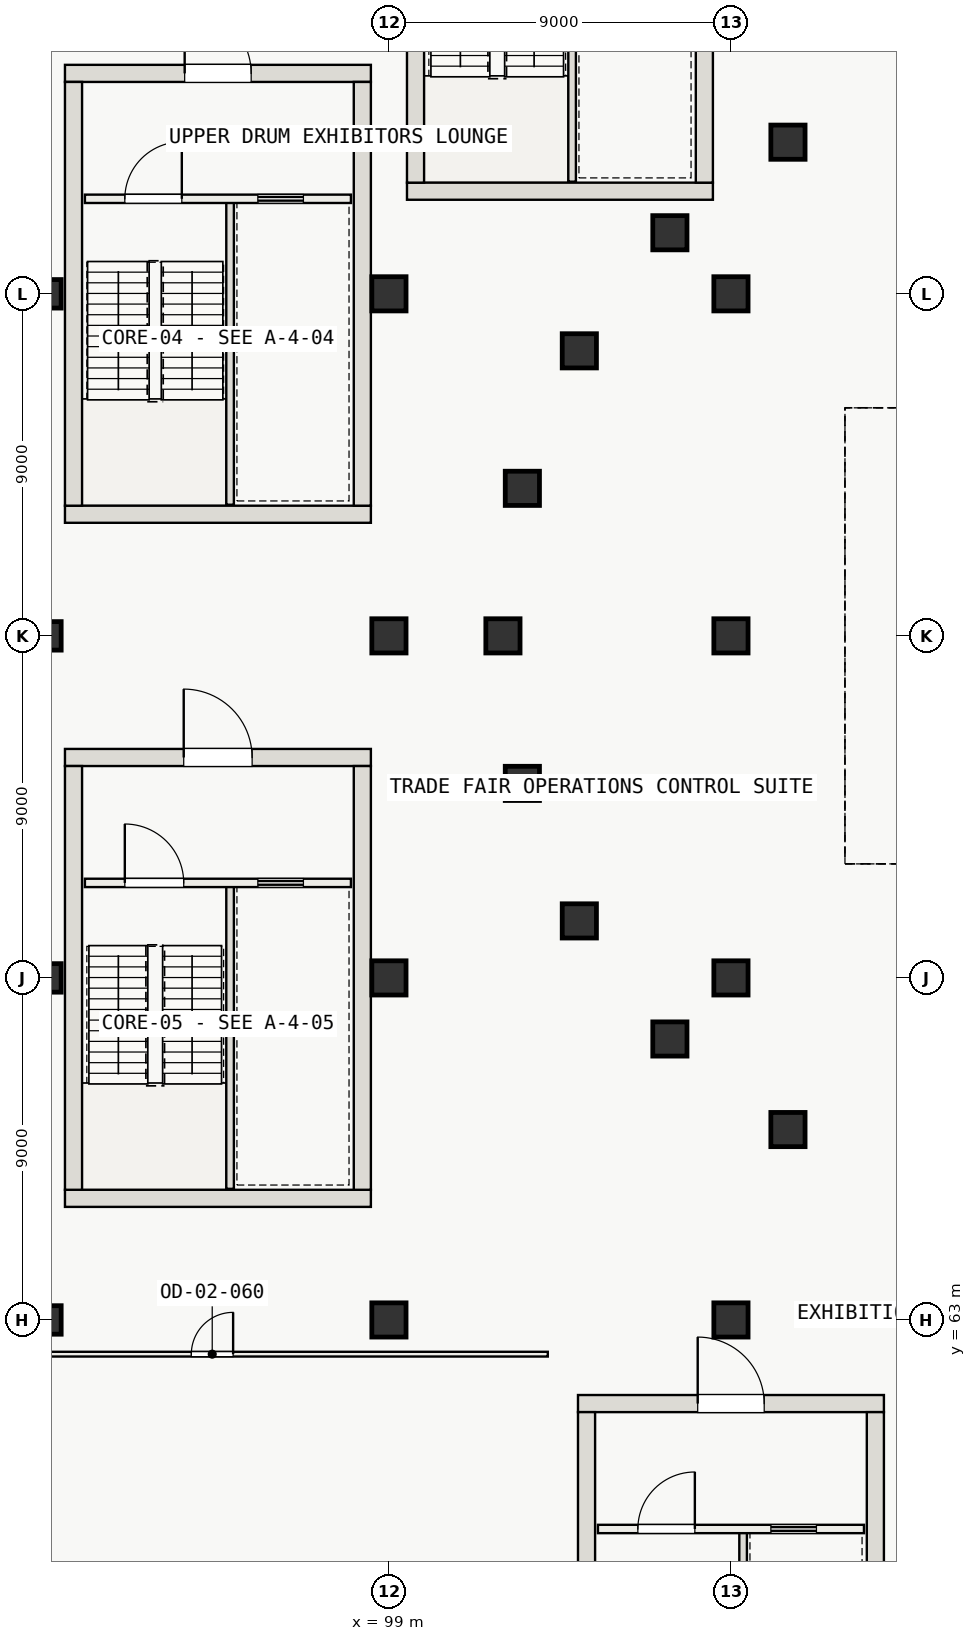
"""IFC4 building model, lengths in metres.
Left out: names, types, materials, properties, quantities, classifications, styles, units other than length and angle.
Written with IfcOpenShell. Run it as: python <this file> out.ifc"""

import sys

from ifc_helpers import new_model, si_unit, direction, frame, frame_2d, origin, origin_2d, place, context, subcontext, project, spatial, rectangle, circle, extrude, element, fill, save


model = new_model("IFC4")
c1 = context("Model", 3, precision=1e-05, world=origin(), true_north=direction((0.0, 1.0)))
c2 = subcontext(c1, "Body", "Model", "MODEL_VIEW")
j1 = project(units=[si_unit("LENGTHUNIT", "METRE"), si_unit("PLANEANGLEUNIT", "RADIAN")], contexts=[c1])
p1 = place(None, origin())
s1 = spatial("IfcSite", under=j1, at=p1, CompositionType="ELEMENT")
p2 = place(p1, origin())
s2 = spatial("IfcBuilding", under=s1, at=p2, CompositionType="ELEMENT")
p3 = place(p2, frame((0.0, 0.0, 16.8)))
s3 = spatial("IfcBuildingStorey", under=s2, at=p3, CompositionType="ELEMENT", Elevation=16.8)
p4 = place(p3, frame((99.475, 92.7, 0.0), z_axis=(0.0, 0.0, 1.0), x_axis=(1.0, 0.0, 0.0)))
e1 = element("IfcWall", 1, at=p4, inside=s3, PredefinedType="SHEAR", context=c2, shape_type="SweptSolid", body=[
    extrude(rectangle(XDim=8.05, YDim=0.45, at=frame_2d((4.025, 0.0))), origin(), (0.0, 0.0, 1.0), 4.8),
])
for number, where, z_axis, x_axis in (
    (2, (99.7, 92.925, 0.0), (0.0, 0.0, 1.0), (0.0, 1.0, 0.0)),
    (3, (107.3, 92.925, 0.0), (0.0, 0.0, 1.0), (0.0, 1.0, 0.0)),
):
    element("IfcWall", number, at=place(p3, frame(where, z_axis=z_axis, x_axis=x_axis)), inside=s3, PredefinedType="SHEAR", context=c2, shape_type="SweptSolid", body=[
        extrude(rectangle(XDim=11.15, YDim=0.45, at=frame_2d((5.575, 0.0))), origin(), (0.0, 0.0, 1.0), 4.8),
    ])
p5 = place(p3, frame((90.475, 84.2, 0.0), z_axis=(0.0, 0.0, 1.0), x_axis=(1.0, 0.0, 0.0)))
e4 = element("IfcWall", 4, at=p5, inside=s3, PredefinedType="SHEAR", context=c2, shape_type="SweptSolid", body=[
    extrude(rectangle(XDim=8.05, YDim=0.45, at=frame_2d((4.025, 0.0))), origin(), (0.0, 0.0, 1.0), 4.8),
])
p6 = place(p3, frame((90.475, 95.8, 0.0), z_axis=(0.0, 0.0, 1.0), x_axis=(1.0, 0.0, 0.0)))
e5 = element("IfcWall", 5, at=p6, inside=s3, PredefinedType="SHEAR", context=c2, shape_type="SweptSolid", body=[
    extrude(rectangle(XDim=8.05, YDim=0.45, at=frame_2d((4.025, 0.0))), origin(), (0.0, 0.0, 1.0), 4.8),
])
p7 = place(p6, frame((3.15, 0.0, 0.0)))
e6 = element("IfcOpeningElement", 6, at=p7, cuts=e5, PredefinedType="OPENING", context=c2, shape_type="SweptSolid", body=[
    extrude(rectangle(XDim=1.75, YDim=2.3, at=frame_2d((0.875, 1.15))), frame((0.0, 0.235, 0.0), z_axis=(0.0, -1.0, 0.0), x_axis=(1.0, 0.0, 0.0)), (0.0, 0.0, 1.0), 0.47),
])
for number, where, z_axis, x_axis in (
    (7, (90.7, 84.425, 0.0), (0.0, 0.0, 1.0), (0.0, 1.0, 0.0)),
    (8, (98.3, 84.425, 0.0), (0.0, 0.0, 1.0), (0.0, 1.0, 0.0)),
):
    element("IfcWall", number, at=place(p3, frame(where, z_axis=z_axis, x_axis=x_axis)), inside=s3, PredefinedType="SHEAR", context=c2, shape_type="SweptSolid", body=[
        extrude(rectangle(XDim=11.15, YDim=0.45, at=frame_2d((5.575, 0.0))), origin(), (0.0, 0.0, 1.0), 4.8),
    ])
p8 = place(p3, frame((90.475, 66.2, 0.0), z_axis=(0.0, 0.0, 1.0), x_axis=(1.0, 0.0, 0.0)))
e9 = element("IfcWall", 9, at=p8, inside=s3, PredefinedType="SHEAR", context=c2, shape_type="SweptSolid", body=[
    extrude(rectangle(XDim=8.05, YDim=0.45, at=frame_2d((4.025, 0.0))), origin(), (0.0, 0.0, 1.0), 4.8),
])
p9 = place(p3, frame((90.475, 77.8, 0.0), z_axis=(0.0, 0.0, 1.0), x_axis=(1.0, 0.0, 0.0)))
e10 = element("IfcWall", 10, at=p9, inside=s3, PredefinedType="SHEAR", context=c2, shape_type="SweptSolid", body=[
    extrude(rectangle(XDim=8.05, YDim=0.45, at=frame_2d((4.025, 0.0))), origin(), (0.0, 0.0, 1.0), 4.8),
])
p10 = place(p9, frame((3.125, 0.0, 0.0)))
e11 = element("IfcOpeningElement", 11, at=p10, cuts=e10, PredefinedType="OPENING", context=c2, shape_type="SweptSolid", body=[
    extrude(rectangle(XDim=1.8, YDim=2.3, at=frame_2d((0.9, 1.15))), frame((0.0, 0.235, 0.0), z_axis=(0.0, -1.0, 0.0), x_axis=(1.0, 0.0, 0.0)), (0.0, 0.0, 1.0), 0.47),
])
for number, where, z_axis, x_axis in (
    (12, (90.7, 66.425, 0.0), (0.0, 0.0, 1.0), (0.0, 1.0, 0.0)),
    (13, (98.3, 66.425, 0.0), (0.0, 0.0, 1.0), (0.0, 1.0, 0.0)),
):
    element("IfcWall", number, at=place(p3, frame(where, z_axis=z_axis, x_axis=x_axis)), inside=s3, PredefinedType="SHEAR", context=c2, shape_type="SweptSolid", body=[
        extrude(rectangle(XDim=11.15, YDim=0.45, at=frame_2d((5.575, 0.0))), origin(), (0.0, 0.0, 1.0), 4.8),
    ])
p11 = place(p3, frame((103.975, 60.8, 0.0), z_axis=(0.0, 0.0, 1.0), x_axis=(1.0, 0.0, 0.0)))
e14 = element("IfcWall", 14, at=p11, inside=s3, PredefinedType="SHEAR", context=c2, shape_type="SweptSolid", body=[
    extrude(rectangle(XDim=8.05, YDim=0.45, at=frame_2d((4.025, 0.0))), origin(), (0.0, 0.0, 1.0), 4.8),
])
p12 = place(p11, frame((3.15, 0.0, 0.0)))
e15 = element("IfcOpeningElement", 15, at=p12, cuts=e14, PredefinedType="OPENING", context=c2, shape_type="SweptSolid", body=[
    extrude(rectangle(XDim=1.75, YDim=2.3, at=frame_2d((0.875, 1.15))), frame((0.0, 0.235, 0.0), z_axis=(0.0, -1.0, 0.0), x_axis=(1.0, 0.0, 0.0)), (0.0, 0.0, 1.0), 0.47),
])
for number, where, z_axis, x_axis in (
    (16, (104.2, 49.425, 0.0), (0.0, 0.0, 1.0), (0.0, 1.0, 0.0)),
    (17, (111.8, 49.425, 0.0), (0.0, 0.0, 1.0), (0.0, 1.0, 0.0)),
):
    element("IfcWall", number, at=place(p3, frame(where, z_axis=z_axis, x_axis=x_axis)), inside=s3, PredefinedType="SHEAR", context=c2, shape_type="SweptSolid", body=[
        extrude(rectangle(XDim=11.15, YDim=0.45, at=frame_2d((5.575, 0.0))), origin(), (0.0, 0.0, 1.0), 4.8),
    ])
for number, where, z_axis, x_axis in (
    (18, (90.0, 63.0, 0.0), (0.0, 0.0, 1.0), (1.0, 0.0, 0.0)),
    (19, (90.0, 72.0, 0.0), (0.0, 0.0, 1.0), (1.0, 0.0, 0.0)),
    (20, (90.0, 81.0, 0.0), (0.0, 0.0, 1.0), (1.0, 0.0, 0.0)),
    (21, (90.0, 90.0, 0.0), (0.0, 0.0, 1.0), (1.0, 0.0, 0.0)),
):
    element("IfcColumn", number, at=place(p3, frame(where, z_axis=z_axis, x_axis=x_axis)), inside=s3, PredefinedType="COLUMN", context=c2, shape_type="SweptSolid", body=[
        extrude(rectangle(XDim=0.75, YDim=0.75, at=origin_2d()), origin(), (0.0, 0.0, 1.0), 4.8),
    ])
for number, where, z_axis, x_axis in (
    (22, (99.0, 63.0, 0.0), (0.0, 0.0, 1.0), (1.0, 0.0, 0.0)),
    (23, (99.0, 72.0, 0.0), (0.0, 0.0, 1.0), (1.0, 0.0, 0.0)),
    (24, (99.0, 81.0, 0.0), (0.0, 0.0, 1.0), (1.0, 0.0, 0.0)),
    (25, (99.0, 90.0, 0.0), (0.0, 0.0, 1.0), (1.0, 0.0, 0.0)),
):
    element("IfcColumn", number, at=place(p3, frame(where, z_axis=z_axis, x_axis=x_axis)), inside=s3, PredefinedType="COLUMN", context=c2, shape_type="SweptSolid", body=[
        extrude(rectangle(XDim=0.9, YDim=0.9, at=origin_2d()), origin(), (0.0, 0.0, 1.0), 4.8),
    ])
for number, where, z_axis, x_axis in (
    (26, (102.0, 81.0, 0.0), (0.0, 0.0, 1.0), (1.0, 0.0, 0.0)),
    (27, (102.511, 77.118, 0.0), (0.0, 0.0, 1.0), (1.0, 0.0, 0.0)),
    (28, (102.511, 84.882, 0.0), (0.0, 0.0, 1.0), (1.0, 0.0, 0.0)),
    (29, (104.01, 73.5, 0.0), (0.0, 0.0, 1.0), (1.0, 0.0, 0.0)),
    (30, (104.01, 88.5, 0.0), (0.0, 0.0, 1.0), (1.0, 0.0, 0.0)),
    (31, (106.393, 70.393, 0.0), (0.0, 0.0, 1.0), (1.0, 0.0, 0.0)),
    (32, (106.393, 91.607, 0.0), (0.0, 0.0, 1.0), (1.0, 0.0, 0.0)),
):
    element("IfcColumn", number, at=place(p3, frame(where, z_axis=z_axis, x_axis=x_axis)), inside=s3, PredefinedType="COLUMN", context=c2, shape_type="SweptSolid", body=[
        extrude(circle(Radius=0.45, at=origin_2d()), origin(), (0.0, 0.0, 1.0), 4.45),
    ])
for number, where, z_axis, x_axis in (
    (33, (108.0, 63.0, 0.0), (0.0, 0.0, 1.0), (1.0, 0.0, 0.0)),
    (34, (108.0, 72.0, 0.0), (0.0, 0.0, 1.0), (1.0, 0.0, 0.0)),
    (35, (108.0, 81.0, 0.0), (0.0, 0.0, 1.0), (1.0, 0.0, 0.0)),
    (36, (108.0, 90.0, 0.0), (0.0, 0.0, 1.0), (1.0, 0.0, 0.0)),
):
    element("IfcColumn", number, at=place(p3, frame(where, z_axis=z_axis, x_axis=x_axis)), inside=s3, PredefinedType="COLUMN", context=c2, shape_type="SweptSolid", body=[
        extrude(rectangle(XDim=0.9, YDim=0.9, at=origin_2d()), origin(), (0.0, 0.0, 1.0), 4.8),
    ])
for number, where, z_axis, x_axis in (
    (37, (109.5, 68.01, 0.0), (0.0, 0.0, 1.0), (1.0, 0.0, 0.0)),
    (38, (109.5, 93.99, 0.0), (0.0, 0.0, 1.0), (1.0, 0.0, 0.0)),
):
    element("IfcColumn", number, at=place(p3, frame(where, z_axis=z_axis, x_axis=x_axis)), inside=s3, PredefinedType="COLUMN", context=c2, shape_type="SweptSolid", body=[
        extrude(circle(Radius=0.45, at=origin_2d()), origin(), (0.0, 0.0, 1.0), 4.45),
    ])
for number, where, z_axis, x_axis in (
    (39, (103.82, 92.95, 0.0), (0.0, 0.0, 1.0), (0.0, 1.0, 0.0)),
    (40, (94.82, 84.45, 0.0), (0.0, 0.0, 1.0), (0.0, 1.0, 0.0)),
):
    element("IfcWall", number, at=place(p3, frame(where, z_axis=z_axis, x_axis=x_axis)), inside=s3, PredefinedType="SOLIDWALL", context=c2, shape_type="SweptSolid", body=[
        extrude(rectangle(XDim=8.0, YDim=0.2, at=frame_2d((4.0, 0.0))), origin(), (0.0, 0.0, 1.0), 4.8),
    ])
p13 = place(p3, frame((91.0, 92.5, 0.0), z_axis=(0.0, 0.0, 1.0), x_axis=(1.0, 0.0, 0.0)))
e41 = element("IfcWall", 41, at=p13, inside=s3, PredefinedType="SOLIDWALL", context=c2, shape_type="SweptSolid", body=[
    extrude(rectangle(XDim=7.0, YDim=0.22, at=frame_2d((3.5, 0.0))), origin(), (0.0, 0.0, 1.0), 4.49),
])
p14 = place(p13, frame((1.05, 0.0, 0.0)))
e42 = element("IfcOpeningElement", 42, at=p14, cuts=e41, PredefinedType="OPENING", context=c2, shape_type="SweptSolid", body=[
    extrude(rectangle(XDim=1.5, YDim=2.2, at=frame_2d((0.75, 1.1))), frame((0.0, 0.12, 0.0), z_axis=(0.0, -1.0, 0.0), x_axis=(1.0, 0.0, 0.0)), (0.0, 0.0, 1.0), 0.24),
])
p15 = place(p13, frame((4.55, 0.0, 0.0)))
e43 = element("IfcOpeningElement", 43, at=p15, cuts=e41, PredefinedType="OPENING", context=c2, shape_type="SweptSolid", body=[
    extrude(rectangle(XDim=1.2, YDim=2.2, at=frame_2d((0.6, 1.1))), frame((0.0, 0.12, 0.0), z_axis=(0.0, -1.0, 0.0), x_axis=(1.0, 0.0, 0.0)), (0.0, 0.0, 1.0), 0.24),
])
p16 = place(p3, frame((94.82, 66.45, 0.0), z_axis=(0.0, 0.0, 1.0), x_axis=(0.0, 1.0, 0.0)))
e44 = element("IfcWall", 44, at=p16, inside=s3, PredefinedType="SOLIDWALL", context=c2, shape_type="SweptSolid", body=[
    extrude(rectangle(XDim=8.0, YDim=0.2, at=frame_2d((4.0, 0.0))), origin(), (0.0, 0.0, 1.0), 4.8),
])
p17 = place(p3, frame((91.0, 74.5, 0.0), z_axis=(0.0, 0.0, 1.0), x_axis=(1.0, 0.0, 0.0)))
e45 = element("IfcWall", 45, at=p17, inside=s3, PredefinedType="SOLIDWALL", context=c2, shape_type="SweptSolid", body=[
    extrude(rectangle(XDim=7.0, YDim=0.22, at=frame_2d((3.5, 0.0))), origin(), (0.0, 0.0, 1.0), 4.49),
])
p18 = place(p17, frame((1.05, 0.0, 0.0)))
e46 = element("IfcOpeningElement", 46, at=p18, cuts=e45, PredefinedType="OPENING", context=c2, shape_type="SweptSolid", body=[
    extrude(rectangle(XDim=1.55, YDim=2.2, at=frame_2d((0.775, 1.1))), frame((0.0, 0.12, 0.0), z_axis=(0.0, -1.0, 0.0), x_axis=(1.0, 0.0, 0.0)), (0.0, 0.0, 1.0), 0.24),
])
p19 = place(p17, frame((4.55, 0.0, 0.0)))
e47 = element("IfcOpeningElement", 47, at=p19, cuts=e45, PredefinedType="OPENING", context=c2, shape_type="SweptSolid", body=[
    extrude(rectangle(XDim=1.2, YDim=2.2, at=frame_2d((0.6, 1.1))), frame((0.0, 0.12, 0.0), z_axis=(0.0, -1.0, 0.0), x_axis=(1.0, 0.0, 0.0)), (0.0, 0.0, 1.0), 0.24),
])
p20 = place(p3, frame((108.32, 49.45, 0.0), z_axis=(0.0, 0.0, 1.0), x_axis=(0.0, 1.0, 0.0)))
e48 = element("IfcWall", 48, at=p20, inside=s3, PredefinedType="SOLIDWALL", context=c2, shape_type="SweptSolid", body=[
    extrude(rectangle(XDim=8.0, YDim=0.2, at=frame_2d((4.0, 0.0))), origin(), (0.0, 0.0, 1.0), 4.8),
])
p21 = place(p3, frame((104.5, 57.5, 0.0), z_axis=(0.0, 0.0, 1.0), x_axis=(1.0, 0.0, 0.0)))
e49 = element("IfcWall", 49, at=p21, inside=s3, PredefinedType="SOLIDWALL", context=c2, shape_type="SweptSolid", body=[
    extrude(rectangle(XDim=7.0, YDim=0.22, at=frame_2d((3.5, 0.0))), origin(), (0.0, 0.0, 1.0), 4.49),
])
p22 = place(p21, frame((1.05, 0.0, 0.0)))
e50 = element("IfcOpeningElement", 50, at=p22, cuts=e49, PredefinedType="OPENING", context=c2, shape_type="SweptSolid", body=[
    extrude(rectangle(XDim=1.5, YDim=2.2, at=frame_2d((0.75, 1.1))), frame((0.0, 0.12, 0.0), z_axis=(0.0, -1.0, 0.0), x_axis=(1.0, 0.0, 0.0)), (0.0, 0.0, 1.0), 0.24),
])
p23 = place(p21, frame((4.55, 0.0, 0.0)))
e51 = element("IfcOpeningElement", 51, at=p23, cuts=e49, PredefinedType="OPENING", context=c2, shape_type="SweptSolid", body=[
    extrude(rectangle(XDim=1.2, YDim=2.2, at=frame_2d((0.6, 1.1))), frame((0.0, 0.12, 0.0), z_axis=(0.0, -1.0, 0.0), x_axis=(1.0, 0.0, 0.0)), (0.0, 0.0, 1.0), 0.24),
])
p24 = place(p3, frame((85.52, 62.1, 0.0), z_axis=(0.0, 0.0, 1.0), x_axis=(1.0, 0.0, 0.0)))
e52 = element("IfcWall", 52, at=p24, inside=s3, PredefinedType="PARTITIONING", context=c2, shape_type="SweptSolid", body=[
    extrude(rectangle(XDim=17.66, YDim=0.125, at=frame_2d((8.83, 0.0))), origin(), (0.0, 0.0, 1.0), 3.5),
])
p25 = place(p24, frame((8.28, 0.0, 0.0)))
e53 = element("IfcOpeningElement", 53, at=p25, cuts=e52, PredefinedType="OPENING", context=c2, shape_type="SweptSolid", body=[
    extrude(rectangle(XDim=1.1, YDim=2.2, at=frame_2d((0.55, 1.1))), frame((0.0, 0.073, 0.0), z_axis=(0.0, -1.0, 0.0), x_axis=(1.0, 0.0, 0.0)), (0.0, 0.0, 1.0), 0.145),
])
p26 = place(p14, origin())
e54 = element("IfcDoor", 54, at=p26, inside=s3, OperationType="SINGLE_SWING_RIGHT", PredefinedType="DOOR", context=c2, shape_type="SweptSolid", body=[
    extrude(rectangle(XDim=1.5, YDim=2.2, at=frame_2d((0.75, 1.1))), frame((0.0, 0.025, 0.0), z_axis=(0.0, -1.0, 0.0), x_axis=(1.0, 0.0, 0.0)), (0.0, 0.0, 1.0), 0.05),
])
fill(e42, e54)
p27 = place(p15, origin())
e55 = element("IfcDoor", 55, at=p27, inside=s3, OperationType="SLIDING_TO_RIGHT", PredefinedType="DOOR", context=c2, shape_type="SweptSolid", body=[
    extrude(rectangle(XDim=1.2, YDim=2.2, at=frame_2d((0.6, 1.1))), frame((0.0, 0.025, 0.0), z_axis=(0.0, -1.0, 0.0), x_axis=(1.0, 0.0, 0.0)), (0.0, 0.0, 1.0), 0.05),
])
fill(e43, e55)
p28 = place(p7, origin())
e56 = element("IfcDoor", 56, at=p28, inside=s3, OperationType="DOUBLE_DOOR_SINGLE_SWING", PredefinedType="DOOR", context=c2, shape_type="SweptSolid", body=[
    extrude(rectangle(XDim=1.75, YDim=2.3, at=frame_2d((0.875, 1.15))), frame((0.0, 0.025, 0.0), z_axis=(0.0, -1.0, 0.0), x_axis=(1.0, 0.0, 0.0)), (0.0, 0.0, 1.0), 0.05),
])
fill(e6, e56)
p29 = place(p18, origin())
e57 = element("IfcDoor", 57, at=p29, inside=s3, OperationType="SINGLE_SWING_LEFT", PredefinedType="DOOR", context=c2, shape_type="SweptSolid", body=[
    extrude(rectangle(XDim=1.55, YDim=2.2, at=frame_2d((0.775, 1.1))), frame((0.0, 0.025, 0.0), z_axis=(0.0, -1.0, 0.0), x_axis=(1.0, 0.0, 0.0)), (0.0, 0.0, 1.0), 0.05),
])
fill(e46, e57)
p30 = place(p19, origin())
e58 = element("IfcDoor", 58, at=p30, inside=s3, OperationType="SLIDING_TO_LEFT", PredefinedType="DOOR", context=c2, shape_type="SweptSolid", body=[
    extrude(rectangle(XDim=1.2, YDim=2.2, at=frame_2d((0.6, 1.1))), frame((0.0, 0.025, 0.0), z_axis=(0.0, -1.0, 0.0), x_axis=(1.0, 0.0, 0.0)), (0.0, 0.0, 1.0), 0.05),
])
fill(e47, e58)
p31 = place(p10, origin())
e59 = element("IfcDoor", 59, at=p31, inside=s3, OperationType="DOUBLE_DOOR_SINGLE_SWING", PredefinedType="DOOR", context=c2, shape_type="SweptSolid", body=[
    extrude(rectangle(XDim=1.8, YDim=2.3, at=frame_2d((0.9, 1.15))), frame((0.0, 0.025, 0.0), z_axis=(0.0, -1.0, 0.0), x_axis=(1.0, 0.0, 0.0)), (0.0, 0.0, 1.0), 0.05),
])
fill(e11, e59)
p32 = place(p22, origin())
e60 = element("IfcDoor", 60, at=p32, inside=s3, OperationType="SINGLE_SWING_RIGHT", PredefinedType="DOOR", context=c2, shape_type="SweptSolid", body=[
    extrude(rectangle(XDim=1.5, YDim=2.2, at=frame_2d((0.75, 1.1))), frame((0.0, 0.025, 0.0), z_axis=(0.0, -1.0, 0.0), x_axis=(1.0, 0.0, 0.0)), (0.0, 0.0, 1.0), 0.05),
])
fill(e50, e60)
p33 = place(p23, origin())
e61 = element("IfcDoor", 61, at=p33, inside=s3, OperationType="SLIDING_TO_RIGHT", PredefinedType="DOOR", context=c2, shape_type="SweptSolid", body=[
    extrude(rectangle(XDim=1.2, YDim=2.2, at=frame_2d((0.6, 1.1))), frame((0.0, 0.025, 0.0), z_axis=(0.0, -1.0, 0.0), x_axis=(1.0, 0.0, 0.0)), (0.0, 0.0, 1.0), 0.05),
])
fill(e51, e61)
p34 = place(p12, origin())
e62 = element("IfcDoor", 62, at=p34, inside=s3, OperationType="DOUBLE_DOOR_SINGLE_SWING", PredefinedType="DOOR", context=c2, shape_type="SweptSolid", body=[
    extrude(rectangle(XDim=1.75, YDim=2.3, at=frame_2d((0.875, 1.15))), frame((0.0, 0.025, 0.0), z_axis=(0.0, -1.0, 0.0), x_axis=(1.0, 0.0, 0.0)), (0.0, 0.0, 1.0), 0.05),
])
fill(e15, e62)
p35 = place(p25, origin())
e63 = element("IfcDoor", 63, at=p35, inside=s3, OperationType="SINGLE_SWING_RIGHT", PredefinedType="DOOR", context=c2, shape_type="SweptSolid", body=[
    extrude(rectangle(XDim=1.1, YDim=2.2, at=frame_2d((0.55, 1.1))), frame((0.0, 0.025, 0.0), z_axis=(0.0, -1.0, 0.0), x_axis=(1.0, 0.0, 0.0)), (0.0, 0.0, 1.0), 0.05),
])
fill(e53, e63)
save(model, sys.argv[1])
